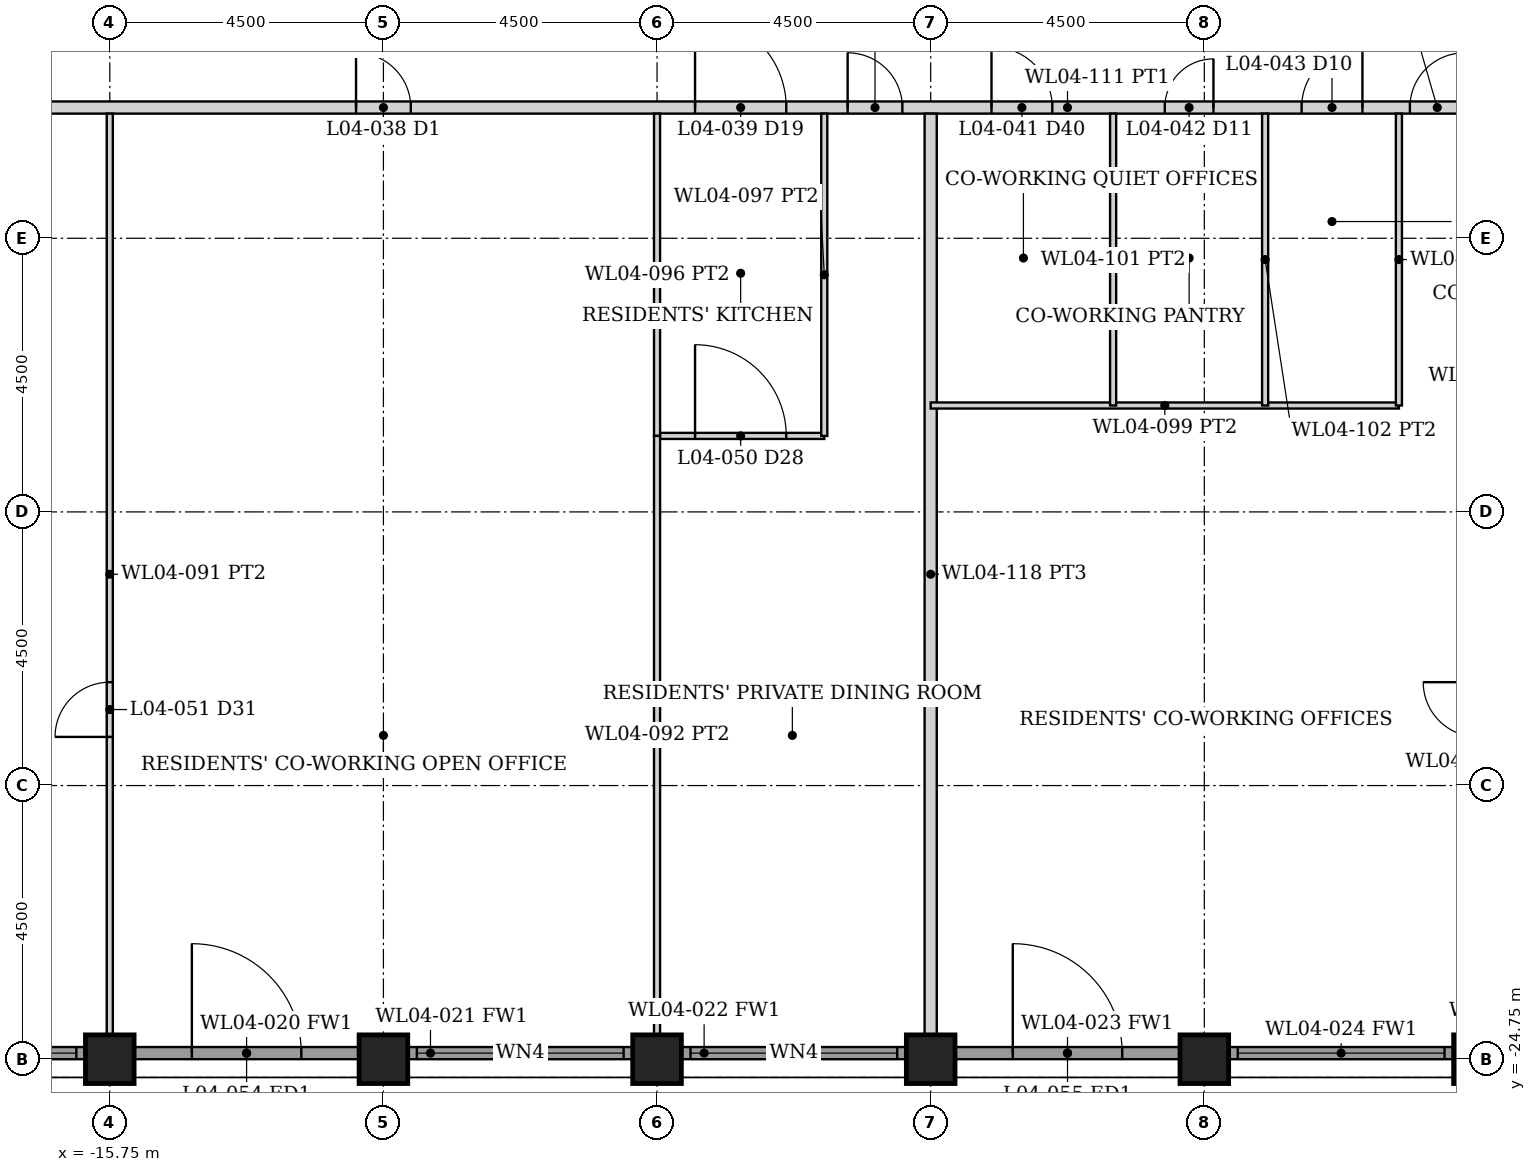
"""IFC4 building model, lengths in metres.
Left out: names, types, materials, properties, quantities, classifications, styles, units other than length and angle.
Written with IfcOpenShell. Run it as: python <this file> out.ifc"""

import sys

from ifc_helpers import new_model, si_unit, direction, frame, frame_2d, origin, origin_2d, place, context, subcontext, project, spatial, rectangle, hollow_rectangle, extrude, element, fill, save


model = new_model("IFC4")
c1 = context("Model", 3, precision=1e-05, world=origin(), true_north=direction((0.0, 1.0)))
c2 = subcontext(c1, "Body", "Model", "MODEL_VIEW")
j1 = project(units=[si_unit("LENGTHUNIT", "METRE"), si_unit("PLANEANGLEUNIT", "RADIAN")], contexts=[c1])
p1 = place(None, origin())
s1 = spatial("IfcSite", under=j1, at=p1, CompositionType="ELEMENT")
p2 = place(p1, origin())
s2 = spatial("IfcBuilding", under=s1, at=p2, CompositionType="ELEMENT")
p3 = place(p2, frame((0.0, 0.0, 21.5)))
s3 = spatial("IfcBuildingStorey", under=s2, at=p3, CompositionType="ELEMENT", Elevation=21.5)
for number, where, z_axis, x_axis in (
    (1, (-15.75, -24.75, 0.0), (0.0, 0.0, 1.0), (0.0, 1.0, 0.0)),
    (2, (-11.25, -24.75, 0.0), (0.0, 0.0, 1.0), (0.0, 1.0, 0.0)),
    (3, (-6.75, -24.75, 0.0), (0.0, 0.0, 1.0), (0.0, 1.0, 0.0)),
    (4, (-2.25, -24.75, 0.0), (0.0, 0.0, 1.0), (0.0, 1.0, 0.0)),
    (5, (2.25, -24.75, 0.0), (0.0, 0.0, 1.0), (0.0, 1.0, 0.0)),
    (6, (6.75, -24.75, 0.0), (0.0, 0.0, 1.0), (0.0, 1.0, 0.0)),
):
    element("IfcColumn", number, at=place(p3, frame(where, z_axis=z_axis, x_axis=x_axis)), inside=s3, PredefinedType="COLUMN", context=c2, shape_type="SweptSolid", body=[
        extrude(hollow_rectangle(XDim=0.8, YDim=0.8, WallThickness=0.08, at=origin_2d()), origin(), (0.0, 0.0, 1.0), 5.0),
    ])
p4 = place(p3, frame((-19.845, -24.65, 0.0), z_axis=(0.0, 0.0, 1.0), x_axis=(1.0, 0.0, 0.0)))
e7 = element("IfcWall", 7, at=p4, inside=s3, PredefinedType="SOLIDWALL", context=c2, shape_type="SweptSolid", body=[
    extrude(rectangle(XDim=3.69, YDim=0.2, at=frame_2d((1.845, 0.0))), origin(), (0.0, 0.0, 1.0), 3.879),
])
p5 = place(p4, frame((0.145, 0.0, 0.3)))
e8 = element("IfcOpeningElement", 8, at=p5, cuts=e7, PredefinedType="OPENING", context=c2, shape_type="SweptSolid", body=[
    extrude(rectangle(XDim=3.4, YDim=3.429, at=frame_2d((1.7, 1.714))), frame((0.0, 0.11, 0.0), z_axis=(0.0, -1.0, 0.0), x_axis=(1.0, 0.0, 0.0)), (0.0, 0.0, 1.0), 0.22),
])
p6 = place(p3, frame((-15.345, -24.65, 0.0), z_axis=(0.0, 0.0, 1.0), x_axis=(1.0, 0.0, 0.0)))
e9 = element("IfcWall", 9, at=p6, inside=s3, PredefinedType="SOLIDWALL", context=c2, shape_type="SweptSolid", body=[
    extrude(rectangle(XDim=3.69, YDim=0.2, at=frame_2d((1.845, 0.0))), origin(), (0.0, 0.0, 1.0), 3.879),
])
p7 = place(p6, frame((0.945, 0.0, 0.0)))
e10 = element("IfcOpeningElement", 10, at=p7, cuts=e9, PredefinedType="OPENING", context=c2, shape_type="SweptSolid", body=[
    extrude(rectangle(XDim=1.8, YDim=2.4, at=frame_2d((0.9, 1.2))), frame((0.0, 0.11, 0.0), z_axis=(0.0, -1.0, 0.0), x_axis=(1.0, 0.0, 0.0)), (0.0, 0.0, 1.0), 0.22),
])
p8 = place(p3, frame((-10.845, -24.65, 0.0), z_axis=(0.0, 0.0, 1.0), x_axis=(1.0, 0.0, 0.0)))
e11 = element("IfcWall", 11, at=p8, inside=s3, PredefinedType="SOLIDWALL", context=c2, shape_type="SweptSolid", body=[
    extrude(rectangle(XDim=3.69, YDim=0.2, at=frame_2d((1.845, 0.0))), origin(), (0.0, 0.0, 1.0), 3.879),
])
p9 = place(p8, frame((0.145, 0.0, 0.3)))
e12 = element("IfcOpeningElement", 12, at=p9, cuts=e11, PredefinedType="OPENING", context=c2, shape_type="SweptSolid", body=[
    extrude(rectangle(XDim=3.4, YDim=3.429, at=frame_2d((1.7, 1.714))), frame((0.0, 0.11, 0.0), z_axis=(0.0, -1.0, 0.0), x_axis=(1.0, 0.0, 0.0)), (0.0, 0.0, 1.0), 0.22),
])
p10 = place(p3, frame((-6.345, -24.65, 0.0), z_axis=(0.0, 0.0, 1.0), x_axis=(1.0, 0.0, 0.0)))
e13 = element("IfcWall", 13, at=p10, inside=s3, PredefinedType="SOLIDWALL", context=c2, shape_type="SweptSolid", body=[
    extrude(rectangle(XDim=3.69, YDim=0.2, at=frame_2d((1.845, 0.0))), origin(), (0.0, 0.0, 1.0), 3.879),
])
p11 = place(p10, frame((0.145, 0.0, 0.3)))
e14 = element("IfcOpeningElement", 14, at=p11, cuts=e13, PredefinedType="OPENING", context=c2, shape_type="SweptSolid", body=[
    extrude(rectangle(XDim=3.4, YDim=3.429, at=frame_2d((1.7, 1.714))), frame((0.0, 0.11, 0.0), z_axis=(0.0, -1.0, 0.0), x_axis=(1.0, 0.0, 0.0)), (0.0, 0.0, 1.0), 0.22),
])
p12 = place(p3, frame((-1.845, -24.65, 0.0), z_axis=(0.0, 0.0, 1.0), x_axis=(1.0, 0.0, 0.0)))
e15 = element("IfcWall", 15, at=p12, inside=s3, PredefinedType="SOLIDWALL", context=c2, shape_type="SweptSolid", body=[
    extrude(rectangle(XDim=3.69, YDim=0.2, at=frame_2d((1.845, 0.0))), origin(), (0.0, 0.0, 1.0), 3.879),
])
p13 = place(p12, frame((0.945, 0.0, 0.0)))
e16 = element("IfcOpeningElement", 16, at=p13, cuts=e15, PredefinedType="OPENING", context=c2, shape_type="SweptSolid", body=[
    extrude(rectangle(XDim=1.8, YDim=2.4, at=frame_2d((0.9, 1.2))), frame((0.0, 0.11, 0.0), z_axis=(0.0, -1.0, 0.0), x_axis=(1.0, 0.0, 0.0)), (0.0, 0.0, 1.0), 0.22),
])
p14 = place(p3, frame((2.655, -24.65, 0.0), z_axis=(0.0, 0.0, 1.0), x_axis=(1.0, 0.0, 0.0)))
e17 = element("IfcWall", 17, at=p14, inside=s3, PredefinedType="SOLIDWALL", context=c2, shape_type="SweptSolid", body=[
    extrude(rectangle(XDim=3.69, YDim=0.2, at=frame_2d((1.845, 0.0))), origin(), (0.0, 0.0, 1.0), 3.879),
])
p15 = place(p14, frame((0.145, 0.0, 0.3)))
e18 = element("IfcOpeningElement", 18, at=p15, cuts=e17, PredefinedType="OPENING", context=c2, shape_type="SweptSolid", body=[
    extrude(rectangle(XDim=3.4, YDim=3.429, at=frame_2d((1.7, 1.714))), frame((0.0, 0.11, 0.0), z_axis=(0.0, -1.0, 0.0), x_axis=(1.0, 0.0, 0.0)), (0.0, 0.0, 1.0), 0.22),
])
p16 = place(p3, frame((-24.55, -9.1, 0.0), z_axis=(0.0, 0.0, 1.0), x_axis=(1.0, 0.0, 0.0)))
e19 = element("IfcWall", 19, at=p16, inside=s3, PredefinedType="PARTITIONING", context=c2, shape_type="SweptSolid", body=[
    extrude(rectangle(XDim=49.1, YDim=0.2, at=frame_2d((24.55, 0.0))), origin(), (0.0, 0.0, 1.0), 3.873),
])
p17 = place(p16, frame((6.452, 0.0, 0.0)))
e20 = element("IfcOpeningElement", 20, at=p17, cuts=e19, PredefinedType="OPENING", context=c2, shape_type="SweptSolid", body=[
    extrude(rectangle(XDim=0.9, YDim=2.1, at=frame_2d((0.45, 1.05))), frame((0.0, 0.11, 0.0), z_axis=(0.0, -1.0, 0.0), x_axis=(1.0, 0.0, 0.0)), (0.0, 0.0, 1.0), 0.22),
])
p18 = place(p16, frame((12.85, 0.0, 0.0)))
e21 = element("IfcOpeningElement", 21, at=p18, cuts=e19, PredefinedType="OPENING", context=c2, shape_type="SweptSolid", body=[
    extrude(rectangle(XDim=0.9, YDim=2.1, at=frame_2d((0.45, 1.05))), frame((0.0, 0.11, 0.0), z_axis=(0.0, -1.0, 0.0), x_axis=(1.0, 0.0, 0.0)), (0.0, 0.0, 1.0), 0.22),
])
p19 = place(p16, frame((20.934, 0.0, 0.0)))
e22 = element("IfcOpeningElement", 22, at=p19, cuts=e19, PredefinedType="OPENING", context=c2, shape_type="SweptSolid", body=[
    extrude(rectangle(XDim=0.9, YDim=2.1, at=frame_2d((0.45, 1.05))), frame((0.0, 0.11, 0.0), z_axis=(0.0, -1.0, 0.0), x_axis=(1.0, 0.0, 0.0)), (0.0, 0.0, 1.0), 0.22),
])
p20 = place(p16, frame((18.425, 0.0, 0.0)))
e23 = element("IfcOpeningElement", 23, at=p20, cuts=e19, PredefinedType="OPENING", context=c2, shape_type="SweptSolid", body=[
    extrude(rectangle(XDim=1.5, YDim=2.1, at=frame_2d((0.75, 1.05))), frame((0.0, 0.11, 0.0), z_axis=(0.0, -1.0, 0.0), x_axis=(1.0, 0.0, 0.0)), (0.0, 0.0, 1.0), 0.22),
])
p21 = place(p16, frame((30.18, 0.0, 0.0)))
e24 = element("IfcOpeningElement", 24, at=p21, cuts=e19, PredefinedType="OPENING", context=c2, shape_type="SweptSolid", body=[
    extrude(rectangle(XDim=0.9, YDim=2.1, at=frame_2d((0.45, 1.05))), frame((0.0, 0.11, 0.0), z_axis=(0.0, -1.0, 0.0), x_axis=(1.0, 0.0, 0.0)), (0.0, 0.0, 1.0), 0.22),
])
p22 = place(p16, frame((23.3, 0.0, 0.0)))
e25 = element("IfcOpeningElement", 25, at=p22, cuts=e19, PredefinedType="OPENING", context=c2, shape_type="SweptSolid", body=[
    extrude(rectangle(XDim=1.0, YDim=2.1, at=frame_2d((0.5, 1.05))), frame((0.0, 0.11, 0.0), z_axis=(0.0, -1.0, 0.0), x_axis=(1.0, 0.0, 0.0)), (0.0, 0.0, 1.0), 0.22),
])
p23 = place(p16, frame((26.15, 0.0, 0.0)))
e26 = element("IfcOpeningElement", 26, at=p23, cuts=e19, PredefinedType="OPENING", context=c2, shape_type="SweptSolid", body=[
    extrude(rectangle(XDim=0.8, YDim=2.1, at=frame_2d((0.4, 1.05))), frame((0.0, 0.11, 0.0), z_axis=(0.0, -1.0, 0.0), x_axis=(1.0, 0.0, 0.0)), (0.0, 0.0, 1.0), 0.22),
])
p24 = place(p16, frame((28.4, 0.0, 0.0)))
e27 = element("IfcOpeningElement", 27, at=p24, cuts=e19, PredefinedType="OPENING", context=c2, shape_type="SweptSolid", body=[
    extrude(rectangle(XDim=1.0, YDim=2.1, at=frame_2d((0.5, 1.05))), frame((0.0, 0.11, 0.0), z_axis=(0.0, -1.0, 0.0), x_axis=(1.0, 0.0, 0.0)), (0.0, 0.0, 1.0), 0.22),
])
p25 = place(p16, frame((33.05, 0.0, 0.0)))
e28 = element("IfcOpeningElement", 28, at=p25, cuts=e19, PredefinedType="OPENING", context=c2, shape_type="SweptSolid", body=[
    extrude(rectangle(XDim=1.0, YDim=2.1, at=frame_2d((0.5, 1.05))), frame((0.0, 0.11, 0.0), z_axis=(0.0, -1.0, 0.0), x_axis=(1.0, 0.0, 0.0)), (0.0, 0.0, 1.0), 0.22),
])
p26 = place(p16, frame((37.625, 0.0, 0.0)))
e29 = element("IfcOpeningElement", 29, at=p26, cuts=e19, PredefinedType="OPENING", context=c2, shape_type="SweptSolid", body=[
    extrude(rectangle(XDim=0.9, YDim=2.1, at=frame_2d((0.45, 1.05))), frame((0.0, 0.11, 0.0), z_axis=(0.0, -1.0, 0.0), x_axis=(1.0, 0.0, 0.0)), (0.0, 0.0, 1.0), 0.22),
])
p27 = place(p16, frame((40.8, 0.0, 0.0)))
e30 = element("IfcOpeningElement", 30, at=p27, cuts=e19, PredefinedType="OPENING", context=c2, shape_type="SweptSolid", body=[
    extrude(rectangle(XDim=1.0, YDim=2.1, at=frame_2d((0.5, 1.05))), frame((0.0, 0.11, 0.0), z_axis=(0.0, -1.0, 0.0), x_axis=(1.0, 0.0, 0.0)), (0.0, 0.0, 1.0), 0.22),
])
p28 = place(p16, frame((42.8, 0.0, 0.0)))
e31 = element("IfcOpeningElement", 31, at=p28, cuts=e19, PredefinedType="OPENING", context=c2, shape_type="SweptSolid", body=[
    extrude(rectangle(XDim=1.0, YDim=2.1, at=frame_2d((0.5, 1.05))), frame((0.0, 0.11, 0.0), z_axis=(0.0, -1.0, 0.0), x_axis=(1.0, 0.0, 0.0)), (0.0, 0.0, 1.0), 0.22),
])
p29 = place(p3, frame((-2.25, -24.35, 0.0), z_axis=(0.0, 0.0, 1.0), x_axis=(0.0, 1.0, 0.0)))
e32 = element("IfcWall", 32, at=p29, inside=s3, PredefinedType="PARTITIONING", context=c2, shape_type="SweptSolid", body=[
    extrude(rectangle(XDim=15.15, YDim=0.2, at=frame_2d((7.575, 0.0))), origin(), (0.0, 0.0, 1.0), 3.873),
])
p30 = place(p3, frame((-6.75, -14.5, 0.0), z_axis=(0.0, 0.0, 1.0), x_axis=(1.0, 0.0, 0.0)))
e33 = element("IfcWall", 33, at=p30, inside=s3, PredefinedType="PARTITIONING", context=c2, shape_type="SweptSolid", body=[
    extrude(rectangle(XDim=2.75, YDim=0.1, at=frame_2d((1.375, 0.0))), origin(), (0.0, 0.0, 1.0), 3.873),
])
p31 = place(p30, frame((0.625, 0.0, 0.0)))
e34 = element("IfcOpeningElement", 34, at=p31, cuts=e33, PredefinedType="OPENING", context=c2, shape_type="SweptSolid", body=[
    extrude(rectangle(XDim=1.5, YDim=2.1, at=frame_2d((0.75, 1.05))), frame((0.0, 0.06, 0.0), z_axis=(0.0, -1.0, 0.0), x_axis=(1.0, 0.0, 0.0)), (0.0, 0.0, 1.0), 0.12),
])
for number, where, z_axis, x_axis in (
    (35, (-6.75, -14.5, 0.0), (0.0, 0.0, 1.0), (0.0, 1.0, 0.0)),
    (36, (-4.0, -14.5, 0.0), (0.0, 0.0, 1.0), (0.0, 1.0, 0.0)),
):
    element("IfcWall", number, at=place(p3, frame(where, z_axis=z_axis, x_axis=x_axis)), inside=s3, PredefinedType="PARTITIONING", context=c2, shape_type="SweptSolid", body=[
        extrude(rectangle(XDim=5.3, YDim=0.1, at=frame_2d((2.65, 0.0))), origin(), (0.0, 0.0, 1.0), 3.873),
    ])
p32 = place(p3, frame((-15.75, -24.35, 0.0), z_axis=(0.0, 0.0, 1.0), x_axis=(0.0, 1.0, 0.0)))
e37 = element("IfcWall", 37, at=p32, inside=s3, PredefinedType="PARTITIONING", context=c2, shape_type="SweptSolid", body=[
    extrude(rectangle(XDim=15.15, YDim=0.1, at=frame_2d((7.575, 0.0))), origin(), (0.0, 0.0, 1.0), 3.873),
])
p33 = place(p32, frame((4.9, 0.0, 0.0)))
e38 = element("IfcOpeningElement", 38, at=p33, cuts=e37, PredefinedType="OPENING", context=c2, shape_type="SweptSolid", body=[
    extrude(rectangle(XDim=0.9, YDim=2.1, at=frame_2d((0.45, 1.05))), frame((0.0, 0.06, 0.0), z_axis=(0.0, -1.0, 0.0), x_axis=(1.0, 0.0, 0.0)), (0.0, 0.0, 1.0), 0.12),
])
p34 = place(p3, frame((-6.75, -24.35, 0.0), z_axis=(0.0, 0.0, 1.0), x_axis=(0.0, 1.0, 0.0)))
e39 = element("IfcWall", 39, at=p34, inside=s3, PredefinedType="PARTITIONING", context=c2, shape_type="SweptSolid", body=[
    extrude(rectangle(XDim=9.85, YDim=0.1, at=frame_2d((4.925, 0.0))), origin(), (0.0, 0.0, 1.0), 3.873),
])
p35 = place(p3, frame((-2.25, -14.0, 0.0), z_axis=(0.0, 0.0, 1.0), x_axis=(1.0, 0.0, 0.0)))
e40 = element("IfcWall", 40, at=p35, inside=s3, PredefinedType="PARTITIONING", context=c2, shape_type="SweptSolid", body=[
    extrude(rectangle(XDim=7.7, YDim=0.1, at=frame_2d((3.85, 0.0))), origin(), (0.0, 0.0, 1.0), 3.873),
])
for number, where, z_axis, x_axis in (
    (41, (0.75, -14.0, 0.0), (0.0, 0.0, 1.0), (0.0, 1.0, 0.0)),
    (42, (3.25, -14.0, 0.0), (0.0, 0.0, 1.0), (0.0, 1.0, 0.0)),
    (43, (5.45, -14.0, 0.0), (0.0, 0.0, 1.0), (0.0, 1.0, 0.0)),
):
    element("IfcWall", number, at=place(p3, frame(where, z_axis=z_axis, x_axis=x_axis)), inside=s3, PredefinedType="PARTITIONING", context=c2, shape_type="SweptSolid", body=[
        extrude(rectangle(XDim=4.8, YDim=0.1, at=frame_2d((2.4, 0.0))), origin(), (0.0, 0.0, 1.0), 3.873),
    ])
p36 = place(p5, origin())
e44 = element("IfcWindow", 44, at=p36, inside=s3, PartitioningType="SINGLE_PANEL", PredefinedType="WINDOW", context=c2, shape_type="SweptSolid", body=[
    extrude(rectangle(XDim=3.4, YDim=3.429, at=frame_2d((1.7, 1.714))), frame((0.0, 0.03, 0.0), z_axis=(0.0, -1.0, 0.0), x_axis=(1.0, 0.0, 0.0)), (0.0, 0.0, 1.0), 0.06),
])
fill(e8, e44)
p37 = place(p7, origin())
e45 = element("IfcDoor", 45, at=p37, inside=s3, OperationType="DOUBLE_DOOR_SINGLE_SWING", PredefinedType="DOOR", context=c2, shape_type="SweptSolid", body=[
    extrude(rectangle(XDim=1.8, YDim=2.4, at=frame_2d((0.9, 1.2))), frame((0.0, 0.025, 0.0), z_axis=(0.0, -1.0, 0.0), x_axis=(1.0, 0.0, 0.0)), (0.0, 0.0, 1.0), 0.05),
])
fill(e10, e45)
p38 = place(p9, origin())
e46 = element("IfcWindow", 46, at=p38, inside=s3, PartitioningType="SINGLE_PANEL", PredefinedType="WINDOW", context=c2, shape_type="SweptSolid", body=[
    extrude(rectangle(XDim=3.4, YDim=3.429, at=frame_2d((1.7, 1.714))), frame((0.0, 0.03, 0.0), z_axis=(0.0, -1.0, 0.0), x_axis=(1.0, 0.0, 0.0)), (0.0, 0.0, 1.0), 0.06),
])
fill(e12, e46)
p39 = place(p11, origin())
e47 = element("IfcWindow", 47, at=p39, inside=s3, PartitioningType="SINGLE_PANEL", PredefinedType="WINDOW", context=c2, shape_type="SweptSolid", body=[
    extrude(rectangle(XDim=3.4, YDim=3.429, at=frame_2d((1.7, 1.714))), frame((0.0, 0.03, 0.0), z_axis=(0.0, -1.0, 0.0), x_axis=(1.0, 0.0, 0.0)), (0.0, 0.0, 1.0), 0.06),
])
fill(e14, e47)
p40 = place(p13, origin())
e48 = element("IfcDoor", 48, at=p40, inside=s3, OperationType="DOUBLE_DOOR_SINGLE_SWING", PredefinedType="DOOR", context=c2, shape_type="SweptSolid", body=[
    extrude(rectangle(XDim=1.8, YDim=2.4, at=frame_2d((0.9, 1.2))), frame((0.0, 0.025, 0.0), z_axis=(0.0, -1.0, 0.0), x_axis=(1.0, 0.0, 0.0)), (0.0, 0.0, 1.0), 0.05),
])
fill(e16, e48)
p41 = place(p15, origin())
e49 = element("IfcWindow", 49, at=p41, inside=s3, PartitioningType="SINGLE_PANEL", PredefinedType="WINDOW", context=c2, shape_type="SweptSolid", body=[
    extrude(rectangle(XDim=3.4, YDim=3.429, at=frame_2d((1.7, 1.714))), frame((0.0, 0.03, 0.0), z_axis=(0.0, -1.0, 0.0), x_axis=(1.0, 0.0, 0.0)), (0.0, 0.0, 1.0), 0.06),
])
fill(e18, e49)
p42 = place(p18, origin())
e50 = element("IfcDoor", 50, at=p42, inside=s3, OperationType="SINGLE_SWING_LEFT", PredefinedType="DOOR", context=c2, shape_type="SweptSolid", body=[
    extrude(rectangle(XDim=0.9, YDim=2.1, at=frame_2d((0.45, 1.05))), frame((0.0, 0.025, 0.0), z_axis=(0.0, -1.0, 0.0), x_axis=(1.0, 0.0, 0.0)), (0.0, 0.0, 1.0), 0.05),
])
fill(e21, e50)
p43 = place(p19, origin())
e51 = element("IfcDoor", 51, at=p43, inside=s3, OperationType="SINGLE_SWING_LEFT", PredefinedType="DOOR", context=c2, shape_type="SweptSolid", body=[
    extrude(rectangle(XDim=0.9, YDim=2.1, at=frame_2d((0.45, 1.05))), frame((0.0, 0.025, 0.0), z_axis=(0.0, -1.0, 0.0), x_axis=(1.0, 0.0, 0.0)), (0.0, 0.0, 1.0), 0.05),
])
fill(e22, e51)
p44 = place(p31, origin())
e52 = element("IfcDoor", 52, at=p44, inside=s3, OperationType="SINGLE_SWING_LEFT", PredefinedType="DOOR", context=c2, shape_type="SweptSolid", body=[
    extrude(rectangle(XDim=1.5, YDim=2.1, at=frame_2d((0.75, 1.05))), frame((0.0, 0.025, 0.0), z_axis=(0.0, -1.0, 0.0), x_axis=(1.0, 0.0, 0.0)), (0.0, 0.0, 1.0), 0.05),
])
fill(e34, e52)
p45 = place(p20, origin())
e53 = element("IfcDoor", 53, at=p45, inside=s3, OperationType="SINGLE_SWING_LEFT", PredefinedType="DOOR", context=c2, shape_type="SweptSolid", body=[
    extrude(rectangle(XDim=1.5, YDim=2.1, at=frame_2d((0.75, 1.05))), frame((0.0, 0.025, 0.0), z_axis=(0.0, -1.0, 0.0), x_axis=(1.0, 0.0, 0.0)), (0.0, 0.0, 1.0), 0.05),
])
fill(e23, e53)
p46 = place(p33, origin())
e54 = element("IfcDoor", 54, at=p46, inside=s3, OperationType="SINGLE_SWING_LEFT", PredefinedType="DOOR", context=c2, shape_type="SweptSolid", body=[
    extrude(rectangle(XDim=0.9, YDim=2.1, at=frame_2d((0.45, 1.05))), frame((0.0, 0.025, 0.0), z_axis=(0.0, -1.0, 0.0), x_axis=(1.0, 0.0, 0.0)), (0.0, 0.0, 1.0), 0.05),
])
fill(e38, e54)
p47 = place(p21, origin())
e55 = element("IfcDoor", 55, at=p47, inside=s3, OperationType="SINGLE_SWING_RIGHT", PredefinedType="DOOR", context=c2, shape_type="SweptSolid", body=[
    extrude(rectangle(XDim=0.9, YDim=2.1, at=frame_2d((0.45, 1.05))), frame((0.0, 0.025, 0.0), z_axis=(0.0, -1.0, 0.0), x_axis=(1.0, 0.0, 0.0)), (0.0, 0.0, 1.0), 0.05),
])
fill(e24, e55)
p48 = place(p22, origin())
e56 = element("IfcDoor", 56, at=p48, inside=s3, OperationType="SINGLE_SWING_LEFT", PredefinedType="DOOR", context=c2, shape_type="SweptSolid", body=[
    extrude(rectangle(XDim=1.0, YDim=2.1, at=frame_2d((0.5, 1.05))), frame((0.0, 0.025, 0.0), z_axis=(0.0, -1.0, 0.0), x_axis=(1.0, 0.0, 0.0)), (0.0, 0.0, 1.0), 0.05),
])
fill(e25, e56)
p49 = place(p23, origin())
e57 = element("IfcDoor", 57, at=p49, inside=s3, OperationType="SINGLE_SWING_RIGHT", PredefinedType="DOOR", context=c2, shape_type="SweptSolid", body=[
    extrude(rectangle(XDim=0.8, YDim=2.1, at=frame_2d((0.4, 1.05))), frame((0.0, 0.025, 0.0), z_axis=(0.0, -1.0, 0.0), x_axis=(1.0, 0.0, 0.0)), (0.0, 0.0, 1.0), 0.05),
])
fill(e26, e57)
p50 = place(p24, origin())
e58 = element("IfcDoor", 58, at=p50, inside=s3, OperationType="SINGLE_SWING_RIGHT", PredefinedType="DOOR", context=c2, shape_type="SweptSolid", body=[
    extrude(rectangle(XDim=1.0, YDim=2.1, at=frame_2d((0.5, 1.05))), frame((0.0, 0.025, 0.0), z_axis=(0.0, -1.0, 0.0), x_axis=(1.0, 0.0, 0.0)), (0.0, 0.0, 1.0), 0.05),
])
fill(e27, e58)
save(model, sys.argv[1])
